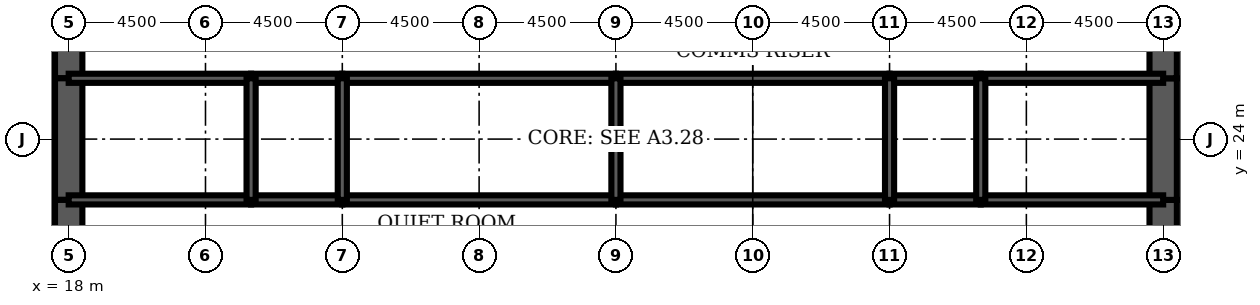
"""IFC4 building model, lengths in metres.
Left out: names, types, materials, properties, quantities, classifications, styles, units other than length and angle.
Written with IfcOpenShell. Run it as: python <this file> out.ifc"""

import sys

from ifc_helpers import new_model, si_unit, direction, frame, frame_2d, origin, place, context, subcontext, project, spatial, rectangle, extrude, element, fill, save


model = new_model("IFC4")
c1 = context("Model", 3, precision=1e-05, world=origin(), true_north=direction((0.0, 1.0)))
c2 = subcontext(c1, "Body", "Model", "MODEL_VIEW")
j1 = project(units=[si_unit("LENGTHUNIT", "METRE"), si_unit("PLANEANGLEUNIT", "RADIAN")], contexts=[c1])
p1 = place(None, origin())
s1 = spatial("IfcSite", under=j1, at=p1, CompositionType="ELEMENT")
p2 = place(p1, origin())
s2 = spatial("IfcBuilding", under=s1, at=p2, CompositionType="ELEMENT")
p3 = place(p2, frame((0.0, 0.0, 121.5)))
s3 = spatial("IfcBuildingStorey", under=s2, at=p3, CompositionType="ELEMENT", Elevation=121.5)
p4 = place(p3, frame((18.0, 28.8, 0.0), z_axis=(0.0, 0.0, 1.0), x_axis=(0.0, -1.0, 0.0)))
e1 = element("IfcWall", 1, at=p4, inside=s3, PredefinedType="SHEAR", context=c2, shape_type="SweptSolid", body=[
    extrude(rectangle(XDim=2.8, YDim=0.9, at=frame_2d((1.4, 0.0))), origin(), (0.0, 0.0, 1.0), 4.2),
])
p5 = place(p4, frame((0.4, 0.0, 0.0)))
e2 = element("IfcOpeningElement", 2, at=p5, cuts=e1, PredefinedType="OPENING", context=c2, shape_type="SweptSolid", body=[
    extrude(rectangle(XDim=1.8, YDim=2.1, at=frame_2d((0.9, 1.05))), frame((0.0, 0.46, 0.0), z_axis=(0.0, -1.0, 0.0), x_axis=(1.0, 0.0, 0.0)), (0.0, 0.0, 1.0), 0.92),
])
p6 = place(p3, frame((18.0, 26.0, 0.0), z_axis=(0.0, 0.0, 1.0), x_axis=(0.0, -1.0, 0.0)))
e3 = element("IfcWall", 3, at=p6, inside=s3, PredefinedType="SHEAR", context=c2, shape_type="SweptSolid", body=[
    extrude(rectangle(XDim=4.0, YDim=0.9, at=frame_2d((2.0, 0.0))), origin(), (0.0, 0.0, 1.0), 4.2),
])
p7 = place(p3, frame((18.0, 22.0, 0.0), z_axis=(0.0, 0.0, 1.0), x_axis=(0.0, -1.0, 0.0)))
e4 = element("IfcWall", 4, at=p7, inside=s3, PredefinedType="SHEAR", context=c2, shape_type="SweptSolid", body=[
    extrude(rectangle(XDim=2.8, YDim=0.9, at=frame_2d((1.4, 0.0))), origin(), (0.0, 0.0, 1.0), 4.2),
])
p8 = place(p7, frame((0.6, 0.0, 0.0)))
e5 = element("IfcOpeningElement", 5, at=p8, cuts=e4, PredefinedType="OPENING", context=c2, shape_type="SweptSolid", body=[
    extrude(rectangle(XDim=1.8, YDim=2.1, at=frame_2d((0.9, 1.05))), frame((0.0, 0.46, 0.0), z_axis=(0.0, -1.0, 0.0), x_axis=(1.0, 0.0, 0.0)), (0.0, 0.0, 1.0), 0.92),
])
p9 = place(p3, frame((54.0, 19.2, 0.0), z_axis=(0.0, 0.0, 1.0), x_axis=(0.0, 1.0, 0.0)))
e6 = element("IfcWall", 6, at=p9, inside=s3, PredefinedType="SHEAR", context=c2, shape_type="SweptSolid", body=[
    extrude(rectangle(XDim=2.8, YDim=0.9, at=frame_2d((1.4, 0.0))), origin(), (0.0, 0.0, 1.0), 4.2),
])
p10 = place(p9, frame((0.4, 0.0, 0.0)))
e7 = element("IfcOpeningElement", 7, at=p10, cuts=e6, PredefinedType="OPENING", context=c2, shape_type="SweptSolid", body=[
    extrude(rectangle(XDim=1.8, YDim=2.1, at=frame_2d((0.9, 1.05))), frame((0.0, 0.46, 0.0), z_axis=(0.0, -1.0, 0.0), x_axis=(1.0, 0.0, 0.0)), (0.0, 0.0, 1.0), 0.92),
])
p11 = place(p3, frame((54.0, 22.0, 0.0), z_axis=(0.0, 0.0, 1.0), x_axis=(0.0, 1.0, 0.0)))
e8 = element("IfcWall", 8, at=p11, inside=s3, PredefinedType="SHEAR", context=c2, shape_type="SweptSolid", body=[
    extrude(rectangle(XDim=4.0, YDim=0.9, at=frame_2d((2.0, 0.0))), origin(), (0.0, 0.0, 1.0), 4.2),
])
p12 = place(p3, frame((54.0, 26.0, 0.0), z_axis=(0.0, 0.0, 1.0), x_axis=(0.0, 1.0, 0.0)))
e9 = element("IfcWall", 9, at=p12, inside=s3, PredefinedType="SHEAR", context=c2, shape_type="SweptSolid", body=[
    extrude(rectangle(XDim=2.8, YDim=0.9, at=frame_2d((1.4, 0.0))), origin(), (0.0, 0.0, 1.0), 4.2),
])
p13 = place(p12, frame((0.6, 0.0, 0.0)))
e10 = element("IfcOpeningElement", 10, at=p13, cuts=e9, PredefinedType="OPENING", context=c2, shape_type="SweptSolid", body=[
    extrude(rectangle(XDim=1.8, YDim=2.1, at=frame_2d((0.9, 1.05))), frame((0.0, 0.46, 0.0), z_axis=(0.0, -1.0, 0.0), x_axis=(1.0, 0.0, 0.0)), (0.0, 0.0, 1.0), 0.92),
])
p14 = place(p3, frame((18.0, 22.0, 0.0), z_axis=(0.0, 0.0, 1.0), x_axis=(1.0, 0.0, 0.0)))
e11 = element("IfcWall", 11, at=p14, inside=s3, PredefinedType="SOLIDWALL", context=c2, shape_type="SweptSolid", body=[
    extrude(rectangle(XDim=6.0, YDim=0.3, at=frame_2d((3.0, 0.0))), origin(), (0.0, 0.0, 1.0), 4.2),
])
p15 = place(p14, frame((4.4, 0.0, 0.0)))
e12 = element("IfcOpeningElement", 12, at=p15, cuts=e11, PredefinedType="OPENING", context=c2, shape_type="SweptSolid", body=[
    extrude(rectangle(XDim=1.0, YDim=2.1, at=frame_2d((0.5, 1.05))), frame((0.0, 0.16, 0.0), z_axis=(0.0, -1.0, 0.0), x_axis=(1.0, 0.0, 0.0)), (0.0, 0.0, 1.0), 0.32),
])
p16 = place(p14, frame((0.85, 0.0, 0.0)))
e13 = element("IfcOpeningElement", 13, at=p16, cuts=e11, PredefinedType="OPENING", context=c2, shape_type="SweptSolid", body=[
    extrude(rectangle(XDim=1.0, YDim=2.1, at=frame_2d((0.5, 1.05))), frame((0.0, 0.16, 0.0), z_axis=(0.0, -1.0, 0.0), x_axis=(1.0, 0.0, 0.0)), (0.0, 0.0, 1.0), 0.32),
])
p17 = place(p3, frame((24.0, 22.0, 0.0), z_axis=(0.0, 0.0, 1.0), x_axis=(1.0, 0.0, 0.0)))
e14 = element("IfcWall", 14, at=p17, inside=s3, PredefinedType="SOLIDWALL", context=c2, shape_type="SweptSolid", body=[
    extrude(rectangle(XDim=3.0, YDim=0.3, at=frame_2d((1.5, 0.0))), origin(), (0.0, 0.0, 1.0), 4.2),
])
p18 = place(p17, frame((1.0, 0.0, 0.0)))
e15 = element("IfcOpeningElement", 15, at=p18, cuts=e14, PredefinedType="OPENING", context=c2, shape_type="SweptSolid", body=[
    extrude(rectangle(XDim=1.0, YDim=2.1, at=frame_2d((0.5, 1.05))), frame((0.0, 0.16, 0.0), z_axis=(0.0, -1.0, 0.0), x_axis=(1.0, 0.0, 0.0)), (0.0, 0.0, 1.0), 0.32),
])
p19 = place(p3, frame((27.0, 22.0, 0.0), z_axis=(0.0, 0.0, 1.0), x_axis=(1.0, 0.0, 0.0)))
e16 = element("IfcWall", 16, at=p19, inside=s3, PredefinedType="SOLIDWALL", context=c2, shape_type="SweptSolid", body=[
    extrude(rectangle(XDim=9.0, YDim=0.3, at=frame_2d((4.5, 0.0))), origin(), (0.0, 0.0, 1.0), 4.2),
])
p20 = place(p19, frame((4.0, 0.0, 0.0)))
e17 = element("IfcOpeningElement", 17, at=p20, cuts=e16, PredefinedType="OPENING", context=c2, shape_type="SweptSolid", body=[
    extrude(rectangle(XDim=1.0, YDim=2.1, at=frame_2d((0.5, 1.05))), frame((0.0, 0.16, 0.0), z_axis=(0.0, -1.0, 0.0), x_axis=(1.0, 0.0, 0.0)), (0.0, 0.0, 1.0), 0.32),
])
p21 = place(p3, frame((36.0, 22.0, 0.0), z_axis=(0.0, 0.0, 1.0), x_axis=(1.0, 0.0, 0.0)))
e18 = element("IfcWall", 18, at=p21, inside=s3, PredefinedType="SOLIDWALL", context=c2, shape_type="SweptSolid", body=[
    extrude(rectangle(XDim=9.0, YDim=0.3, at=frame_2d((4.5, 0.0))), origin(), (0.0, 0.0, 1.0), 4.2),
])
p22 = place(p21, frame((4.0, 0.0, 0.0)))
e19 = element("IfcOpeningElement", 19, at=p22, cuts=e18, PredefinedType="OPENING", context=c2, shape_type="SweptSolid", body=[
    extrude(rectangle(XDim=1.0, YDim=2.1, at=frame_2d((0.5, 1.05))), frame((0.0, 0.16, 0.0), z_axis=(0.0, -1.0, 0.0), x_axis=(1.0, 0.0, 0.0)), (0.0, 0.0, 1.0), 0.32),
])
p23 = place(p3, frame((45.0, 22.0, 0.0), z_axis=(0.0, 0.0, 1.0), x_axis=(1.0, 0.0, 0.0)))
e20 = element("IfcWall", 20, at=p23, inside=s3, PredefinedType="SOLIDWALL", context=c2, shape_type="SweptSolid", body=[
    extrude(rectangle(XDim=3.0, YDim=0.3, at=frame_2d((1.5, 0.0))), origin(), (0.0, 0.0, 1.0), 4.2),
])
p24 = place(p23, frame((1.0, 0.0, 0.0)))
e21 = element("IfcOpeningElement", 21, at=p24, cuts=e20, PredefinedType="OPENING", context=c2, shape_type="SweptSolid", body=[
    extrude(rectangle(XDim=1.0, YDim=2.1, at=frame_2d((0.5, 1.05))), frame((0.0, 0.16, 0.0), z_axis=(0.0, -1.0, 0.0), x_axis=(1.0, 0.0, 0.0)), (0.0, 0.0, 1.0), 0.32),
])
p25 = place(p3, frame((48.0, 22.0, 0.0), z_axis=(0.0, 0.0, 1.0), x_axis=(1.0, 0.0, 0.0)))
e22 = element("IfcWall", 22, at=p25, inside=s3, PredefinedType="SOLIDWALL", context=c2, shape_type="SweptSolid", body=[
    extrude(rectangle(XDim=6.0, YDim=0.3, at=frame_2d((3.0, 0.0))), origin(), (0.0, 0.0, 1.0), 4.2),
])
p26 = place(p25, frame((2.0, 0.0, 0.0)))
e23 = element("IfcOpeningElement", 23, at=p26, cuts=e22, PredefinedType="OPENING", context=c2, shape_type="SweptSolid", body=[
    extrude(rectangle(XDim=1.0, YDim=2.1, at=frame_2d((0.5, 1.05))), frame((0.0, 0.16, 0.0), z_axis=(0.0, -1.0, 0.0), x_axis=(1.0, 0.0, 0.0)), (0.0, 0.0, 1.0), 0.32),
])
p27 = place(p25, frame((4.3, 0.0, 0.0)))
e24 = element("IfcOpeningElement", 24, at=p27, cuts=e22, PredefinedType="OPENING", context=c2, shape_type="SweptSolid", body=[
    extrude(rectangle(XDim=1.0, YDim=2.1, at=frame_2d((0.5, 1.05))), frame((0.0, 0.16, 0.0), z_axis=(0.0, -1.0, 0.0), x_axis=(1.0, 0.0, 0.0)), (0.0, 0.0, 1.0), 0.32),
])
p28 = place(p3, frame((18.0, 26.0, 0.0), z_axis=(0.0, 0.0, 1.0), x_axis=(1.0, 0.0, 0.0)))
e25 = element("IfcWall", 25, at=p28, inside=s3, PredefinedType="SOLIDWALL", context=c2, shape_type="SweptSolid", body=[
    extrude(rectangle(XDim=6.0, YDim=0.3, at=frame_2d((3.0, 0.0))), origin(), (0.0, 0.0, 1.0), 4.2),
])
p29 = place(p3, frame((24.0, 26.0, 0.0), z_axis=(0.0, 0.0, 1.0), x_axis=(1.0, 0.0, 0.0)))
e26 = element("IfcWall", 26, at=p29, inside=s3, PredefinedType="SOLIDWALL", context=c2, shape_type="SweptSolid", body=[
    extrude(rectangle(XDim=3.0, YDim=0.3, at=frame_2d((1.5, 0.0))), origin(), (0.0, 0.0, 1.0), 4.2),
])
for number, where, z_axis, x_axis in (
    (27, (27.0, 26.0, 0.0), (0.0, 0.0, 1.0), (1.0, 0.0, 0.0)),
    (28, (36.0, 26.0, 0.0), (0.0, 0.0, 1.0), (1.0, 0.0, 0.0)),
):
    element("IfcWall", number, at=place(p3, frame(where, z_axis=z_axis, x_axis=x_axis)), inside=s3, PredefinedType="SOLIDWALL", context=c2, shape_type="SweptSolid", body=[
        extrude(rectangle(XDim=9.0, YDim=0.3, at=frame_2d((4.5, 0.0))), origin(), (0.0, 0.0, 1.0), 4.2),
    ])
p30 = place(p3, frame((45.0, 26.0, 0.0), z_axis=(0.0, 0.0, 1.0), x_axis=(1.0, 0.0, 0.0)))
e29 = element("IfcWall", 29, at=p30, inside=s3, PredefinedType="SOLIDWALL", context=c2, shape_type="SweptSolid", body=[
    extrude(rectangle(XDim=3.0, YDim=0.3, at=frame_2d((1.5, 0.0))), origin(), (0.0, 0.0, 1.0), 4.2),
])
p31 = place(p3, frame((48.0, 26.0, 0.0), z_axis=(0.0, 0.0, 1.0), x_axis=(1.0, 0.0, 0.0)))
e30 = element("IfcWall", 30, at=p31, inside=s3, PredefinedType="SOLIDWALL", context=c2, shape_type="SweptSolid", body=[
    extrude(rectangle(XDim=6.0, YDim=0.3, at=frame_2d((3.0, 0.0))), origin(), (0.0, 0.0, 1.0), 4.2),
])
for number, where, z_axis, x_axis in (
    (31, (24.0, 22.0, 0.0), (0.0, 0.0, 1.0), (0.0, 1.0, 0.0)),
    (32, (27.0, 22.0, 0.0), (0.0, 0.0, 1.0), (0.0, 1.0, 0.0)),
    (33, (36.0, 22.0, 0.0), (0.0, 0.0, 1.0), (0.0, 1.0, 0.0)),
    (34, (45.0, 22.0, 0.0), (0.0, 0.0, 1.0), (0.0, 1.0, 0.0)),
    (35, (48.0, 22.0, 0.0), (0.0, 0.0, 1.0), (0.0, 1.0, 0.0)),
):
    element("IfcWall", number, at=place(p3, frame(where, z_axis=z_axis, x_axis=x_axis)), inside=s3, PredefinedType="SOLIDWALL", context=c2, shape_type="SweptSolid", body=[
        extrude(rectangle(XDim=4.0, YDim=0.3, at=frame_2d((2.0, 0.0))), origin(), (0.0, 0.0, 1.0), 4.2),
    ])
p32 = place(p3, frame((42.0, 22.15, 0.0), z_axis=(0.0, 0.0, 1.0), x_axis=(0.0, 1.0, 0.0)))
e36 = element("IfcWall", 36, at=p32, inside=s3, PredefinedType="PARTITIONING", context=c2, shape_type="SweptSolid", body=[
    extrude(rectangle(XDim=3.7, YDim=0.15, at=frame_2d((1.85, 0.0))), origin(), (0.0, 0.0, 1.0), 3.0),
])
p33 = place(p32, frame((2.2, 0.0, 0.0)))
e37 = element("IfcOpeningElement", 37, at=p33, cuts=e36, PredefinedType="OPENING", context=c2, shape_type="SweptSolid", body=[
    extrude(rectangle(XDim=1.0, YDim=2.1, at=frame_2d((0.5, 1.05))), frame((0.0, 0.085, 0.0), z_axis=(0.0, -1.0, 0.0), x_axis=(1.0, 0.0, 0.0)), (0.0, 0.0, 1.0), 0.17),
])
for number, where, z_axis, x_axis in (
    (38, (20.325, 22.15, 0.0), (0.0, 0.0, 1.0), (0.0, 1.0, 0.0)),
    (39, (51.975, 22.15, 0.0), (0.0, 0.0, 1.0), (0.0, 1.0, 0.0)),
):
    element("IfcWall", number, at=place(p3, frame(where, z_axis=z_axis, x_axis=x_axis)), inside=s3, PredefinedType="PARTITIONING", context=c2, shape_type="SweptSolid", body=[
        extrude(rectangle(XDim=3.7, YDim=0.15, at=frame_2d((1.85, 0.0))), origin(), (0.0, 0.0, 1.0), 3.0),
    ])
p34 = place(p33, origin())
e40 = element("IfcDoor", 40, at=p34, inside=s3, OperationType="SINGLE_SWING_RIGHT", PredefinedType="DOOR", context=c2, shape_type="SweptSolid", body=[
    extrude(rectangle(XDim=1.0, YDim=2.1, at=frame_2d((0.5, 1.05))), frame((0.0, 0.025, 0.0), z_axis=(0.0, -1.0, 0.0), x_axis=(1.0, 0.0, 0.0)), (0.0, 0.0, 1.0), 0.05),
])
fill(e37, e40)
p35 = place(p8, origin())
e41 = element("IfcDoor", 41, at=p35, inside=s3, OperationType="SINGLE_SWING_LEFT", PredefinedType="DOOR", context=c2, shape_type="SweptSolid", body=[
    extrude(rectangle(XDim=1.8, YDim=2.1, at=frame_2d((0.9, 1.05))), frame((0.0, 0.45, 0.0), z_axis=(0.0, -1.0, 0.0), x_axis=(1.0, 0.0, 0.0)), (0.0, 0.0, 1.0), 0.899),
])
fill(e5, e41)
p36 = place(p5, origin())
e42 = element("IfcDoor", 42, at=p36, inside=s3, OperationType="SINGLE_SWING_LEFT", PredefinedType="DOOR", context=c2, shape_type="SweptSolid", body=[
    extrude(rectangle(XDim=1.8, YDim=2.1, at=frame_2d((0.9, 1.05))), frame((0.0, 0.45, 0.0), z_axis=(0.0, -1.0, 0.0), x_axis=(1.0, 0.0, 0.0)), (0.0, 0.0, 1.0), 0.899),
])
fill(e2, e42)
p37 = place(p10, origin())
e43 = element("IfcDoor", 43, at=p37, inside=s3, OperationType="SINGLE_SWING_LEFT", PredefinedType="DOOR", context=c2, shape_type="SweptSolid", body=[
    extrude(rectangle(XDim=1.8, YDim=2.1, at=frame_2d((0.9, 1.05))), frame((0.0, 0.45, 0.0), z_axis=(0.0, -1.0, 0.0), x_axis=(1.0, 0.0, 0.0)), (0.0, 0.0, 1.0), 0.899),
])
fill(e7, e43)
p38 = place(p13, origin())
e44 = element("IfcDoor", 44, at=p38, inside=s3, OperationType="SINGLE_SWING_LEFT", PredefinedType="DOOR", context=c2, shape_type="SweptSolid", body=[
    extrude(rectangle(XDim=1.8, YDim=2.1, at=frame_2d((0.9, 1.05))), frame((0.0, 0.45, 0.0), z_axis=(0.0, -1.0, 0.0), x_axis=(1.0, 0.0, 0.0)), (0.0, 0.0, 1.0), 0.899),
])
fill(e10, e44)
p39 = place(p15, origin())
e45 = element("IfcDoor", 45, at=p39, inside=s3, OperationType="SINGLE_SWING_RIGHT", PredefinedType="DOOR", context=c2, shape_type="SweptSolid", body=[
    extrude(rectangle(XDim=1.0, YDim=2.1, at=frame_2d((0.5, 1.05))), frame((0.0, 0.025, 0.0), z_axis=(0.0, -1.0, 0.0), x_axis=(1.0, 0.0, 0.0)), (0.0, 0.0, 1.0), 0.05),
])
fill(e12, e45)
p40 = place(p18, origin())
e46 = element("IfcDoor", 46, at=p40, inside=s3, OperationType="SINGLE_SWING_LEFT", PredefinedType="DOOR", context=c2, shape_type="SweptSolid", body=[
    extrude(rectangle(XDim=1.0, YDim=2.1, at=frame_2d((0.5, 1.05))), frame((0.0, 0.025, 0.0), z_axis=(0.0, -1.0, 0.0), x_axis=(1.0, 0.0, 0.0)), (0.0, 0.0, 1.0), 0.05),
])
fill(e15, e46)
p41 = place(p20, origin())
e47 = element("IfcDoor", 47, at=p41, inside=s3, OperationType="SINGLE_SWING_LEFT", PredefinedType="DOOR", context=c2, shape_type="SweptSolid", body=[
    extrude(rectangle(XDim=1.0, YDim=2.1, at=frame_2d((0.5, 1.05))), frame((0.0, 0.025, 0.0), z_axis=(0.0, -1.0, 0.0), x_axis=(1.0, 0.0, 0.0)), (0.0, 0.0, 1.0), 0.05),
])
fill(e17, e47)
p42 = place(p22, origin())
e48 = element("IfcDoor", 48, at=p42, inside=s3, OperationType="SINGLE_SWING_LEFT", PredefinedType="DOOR", context=c2, shape_type="SweptSolid", body=[
    extrude(rectangle(XDim=1.0, YDim=2.1, at=frame_2d((0.5, 1.05))), frame((0.0, 0.025, 0.0), z_axis=(0.0, -1.0, 0.0), x_axis=(1.0, 0.0, 0.0)), (0.0, 0.0, 1.0), 0.05),
])
fill(e19, e48)
p43 = place(p24, origin())
e49 = element("IfcDoor", 49, at=p43, inside=s3, OperationType="SINGLE_SWING_LEFT", PredefinedType="DOOR", context=c2, shape_type="SweptSolid", body=[
    extrude(rectangle(XDim=1.0, YDim=2.1, at=frame_2d((0.5, 1.05))), frame((0.0, 0.025, 0.0), z_axis=(0.0, -1.0, 0.0), x_axis=(1.0, 0.0, 0.0)), (0.0, 0.0, 1.0), 0.05),
])
fill(e21, e49)
p44 = place(p26, origin())
e50 = element("IfcDoor", 50, at=p44, inside=s3, OperationType="SINGLE_SWING_LEFT", PredefinedType="DOOR", context=c2, shape_type="SweptSolid", body=[
    extrude(rectangle(XDim=1.0, YDim=2.1, at=frame_2d((0.5, 1.05))), frame((0.0, 0.025, 0.0), z_axis=(0.0, -1.0, 0.0), x_axis=(1.0, 0.0, 0.0)), (0.0, 0.0, 1.0), 0.05),
])
fill(e23, e50)
p45 = place(p16, origin())
e51 = element("IfcDoor", 51, at=p45, inside=s3, OperationType="SINGLE_SWING_LEFT", PredefinedType="DOOR", context=c2, shape_type="SweptSolid", body=[
    extrude(rectangle(XDim=1.0, YDim=2.1, at=frame_2d((0.5, 1.05))), frame((0.0, 0.025, 0.0), z_axis=(0.0, -1.0, 0.0), x_axis=(1.0, 0.0, 0.0)), (0.0, 0.0, 1.0), 0.05),
])
fill(e13, e51)
p46 = place(p27, origin())
e52 = element("IfcDoor", 52, at=p46, inside=s3, OperationType="SINGLE_SWING_RIGHT", PredefinedType="DOOR", context=c2, shape_type="SweptSolid", body=[
    extrude(rectangle(XDim=1.0, YDim=2.1, at=frame_2d((0.5, 1.05))), frame((0.0, 0.025, 0.0), z_axis=(0.0, -1.0, 0.0), x_axis=(1.0, 0.0, 0.0)), (0.0, 0.0, 1.0), 0.05),
])
fill(e24, e52)
save(model, sys.argv[1])
